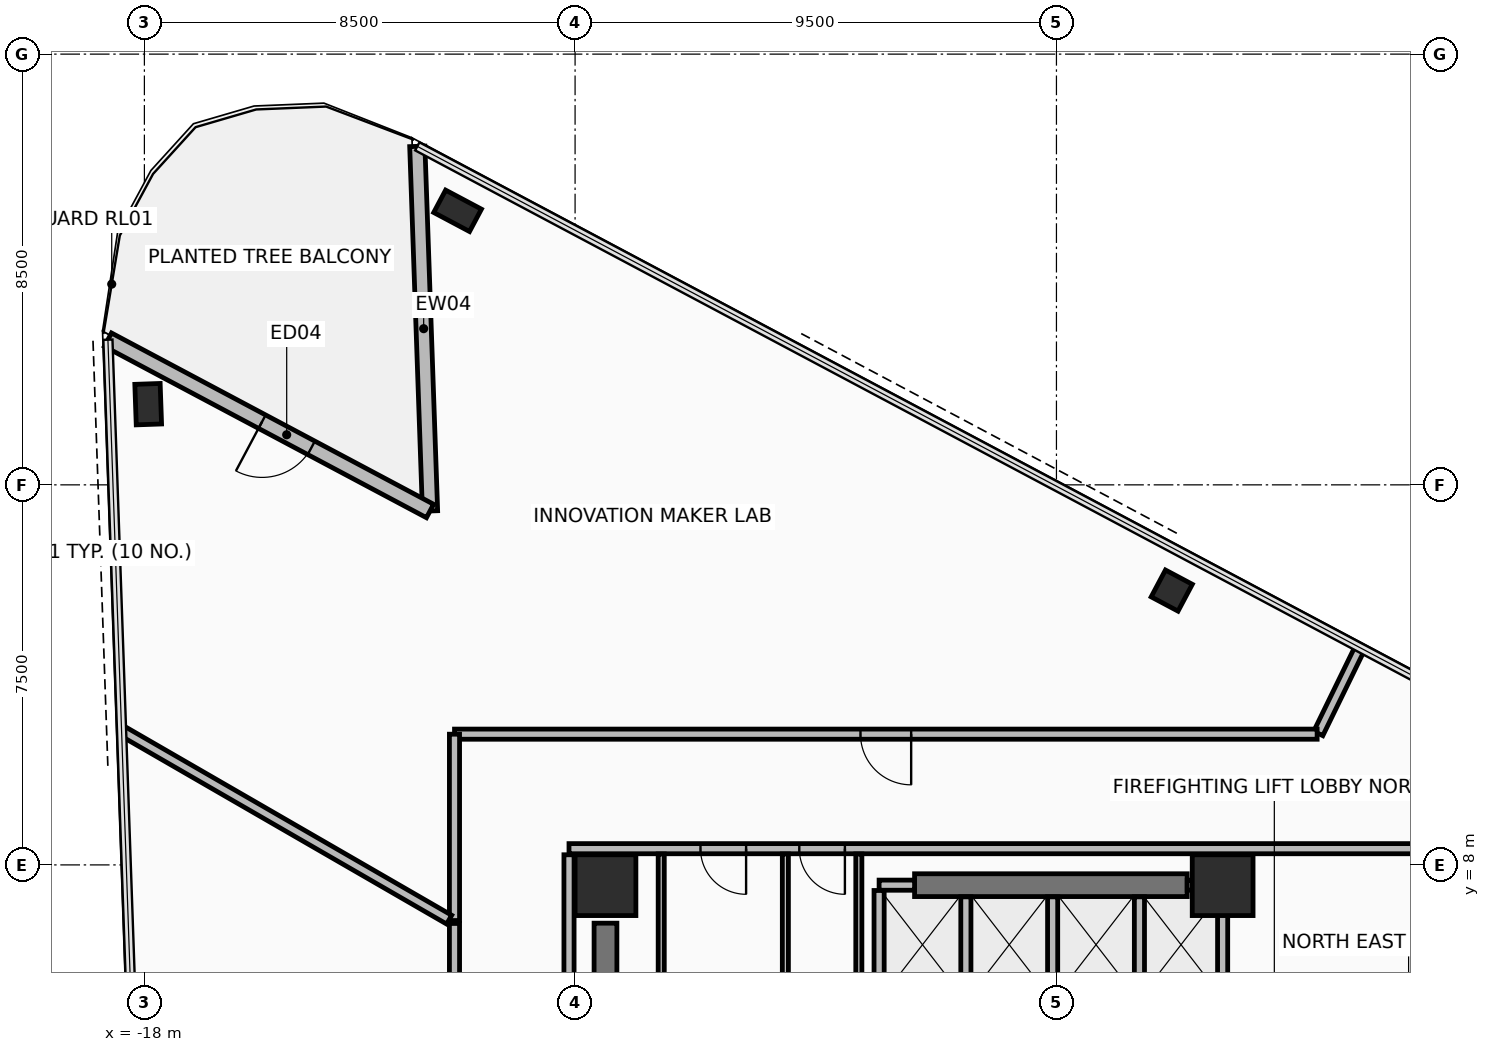
"""IFC4 building model, lengths in metres.
Left out: names, types, materials, properties, quantities, classifications, styles, units other than length and angle.
Written with IfcOpenShell. Run it as: python <this file> out.ifc"""

import sys

from ifc_helpers import new_model, si_unit, direction, frame, frame_2d, origin, origin_2d, place, context, subcontext, project, spatial, rectangle, hollow_rectangle, extrude, element, fill, save


model = new_model("IFC4")
c1 = context("Model", 3, precision=1e-05, world=origin(), true_north=direction((0.0, 1.0)))
c2 = subcontext(c1, "Body", "Model", "MODEL_VIEW")
j1 = project(units=[si_unit("LENGTHUNIT", "METRE"), si_unit("PLANEANGLEUNIT", "RADIAN")], contexts=[c1])
p1 = place(None, origin())
s1 = spatial("IfcSite", under=j1, at=p1, CompositionType="ELEMENT")
p2 = place(p1, origin())
s2 = spatial("IfcBuilding", under=s1, at=p2, CompositionType="ELEMENT")
p3 = place(p2, frame((0.0, 0.0, 160.4)))
s3 = spatial("IfcBuildingStorey", under=s2, at=p3, CompositionType="ELEMENT", Elevation=160.4)
for number, where, z_axis, x_axis in (
    (1, (3.28, 7.6, 0.0), (0.0, 0.0, 1.0), (1.0, 0.0, 0.0)),
    (2, (-8.9, 7.6, 0.0), (0.0, 0.0, 1.0), (1.0, 0.0, 0.0)),
):
    element("IfcColumn", number, at=place(p3, frame(where, z_axis=z_axis, x_axis=x_axis)), inside=s3, PredefinedType="COLUMN", context=c2, shape_type="SweptSolid", body=[
        extrude(rectangle(XDim=1.2, YDim=1.2, at=origin_2d()), origin(), (0.0, 0.0, 1.0), 4.75),
    ])
p4 = place(p3, frame((-17.925, 17.092, 0.0), z_axis=(0.0, 0.0, 1.0), x_axis=(-0.034899496703, 0.999390827019, 0.0)))
e3 = element("IfcColumn", 3, at=p4, inside=s3, PredefinedType="COLUMN", context=c2, shape_type="SweptSolid", body=[
    extrude(hollow_rectangle(XDim=0.5, YDim=0.8, WallThickness=0.04, at=origin_2d()), origin(), (0.0, 0.0, 1.0), 4.75),
])
p5 = place(p3, frame((2.276, 13.414, 0.0), z_axis=(0.0, 0.0, 1.0), x_axis=(-0.88294841224, 0.469470021751, 0.0)))
e4 = element("IfcColumn", 4, at=p5, inside=s3, PredefinedType="COLUMN", context=c2, shape_type="SweptSolid", body=[
    extrude(hollow_rectangle(XDim=0.6, YDim=0.6, WallThickness=0.036, at=origin_2d()), origin(), (0.0, 0.0, 1.0), 4.75),
])
p6 = place(p3, frame((-11.819, 20.908, 0.0), z_axis=(0.0, 0.0, 1.0), x_axis=(-0.88294841224, 0.469470021751, 0.0)))
e5 = element("IfcColumn", 5, at=p6, inside=s3, PredefinedType="COLUMN", context=c2, shape_type="SweptSolid", body=[
    extrude(hollow_rectangle(XDim=0.5, YDim=0.8, WallThickness=0.04, at=origin_2d()), origin(), (0.0, 0.0, 1.0), 4.75),
])
p7 = place(p3, frame((-12.614, 22.18, 0.0), z_axis=(0.0, 0.0, 1.0), x_axis=(0.034925918675, -0.999389903994, 0.0)))
e6 = element("IfcWall", 6, at=p7, inside=s3, PredefinedType="STANDARD", context=c2, shape_type="SweptSolid", body=[
    extrude(rectangle(XDim=7.2, YDim=0.3, at=frame_2d((3.6, 0.0))), origin(), (0.0, 0.0, 1.0), 2.25),
])
p8 = place(p3, frame((-12.363, 14.984, 0.0), z_axis=(0.0, 0.0, 1.0), x_axis=(-0.882950149473, 0.469466754463, 0.0)))
e7 = element("IfcWall", 7, at=p8, inside=s3, PredefinedType="STANDARD", context=c2, shape_type="SweptSolid", body=[
    extrude(rectangle(XDim=7.2, YDim=0.3, at=frame_2d((3.6, 0.0))), origin(), (0.0, 0.0, 1.0), 2.25),
])
p9 = place(p8, frame((2.654, 0.0, 0.0)))
e8 = element("IfcOpeningElement", 8, at=p9, cuts=e7, PredefinedType="OPENING", context=c2, shape_type="SweptSolid", body=[
    extrude(rectangle(XDim=1.1, YDim=2.2, at=frame_2d((0.55, 1.1))), frame((0.0, 0.16, 0.0), z_axis=(0.0, -1.0, 0.0), x_axis=(1.0, 0.0, 0.0)), (0.0, 0.0, 1.0), 0.32),
])
p10 = place(p3, frame((-2.8, 7.6, 0.0), z_axis=(0.0, 0.0, 1.0), x_axis=(1.0, 0.0, 0.0)))
e9 = element("IfcWall", 9, at=p10, inside=s3, PredefinedType="SHEAR", context=c2, shape_type="SweptSolid", body=[
    extrude(rectangle(XDim=5.38, YDim=0.45, at=frame_2d((2.69, 0.0))), origin(), (0.0, 0.0, 1.0), 4.555),
])
p11 = place(p3, frame((-8.9, -3.85, 0.0), z_axis=(0.0, 0.0, 1.0), x_axis=(0.0, 1.0, 0.0)))
e10 = element("IfcWall", 10, at=p11, inside=s3, PredefinedType="SHEAR", context=c2, shape_type="SweptSolid", body=[
    extrude(rectangle(XDim=10.7, YDim=0.45, at=frame_2d((5.35, 0.0))), origin(), (0.0, 0.0, 1.0), 4.555),
])
p12 = place(p3, frame((9.62, 8.32, 0.0), z_axis=(0.0, 0.0, 1.0), x_axis=(-1.0, 0.0, 0.0)))
e11 = element("IfcWall", 11, at=p12, inside=s3, PredefinedType="PARTITIONING", context=c2, shape_type="SweptSolid", body=[
    extrude(rectangle(XDim=19.24, YDim=0.2, at=frame_2d((9.62, 0.0))), origin(), (0.0, 0.0, 1.0), 2.75),
])
p13 = place(p12, frame((15.745, 0.0, 0.0)))
e12 = element("IfcOpeningElement", 12, at=p13, cuts=e11, PredefinedType="OPENING", context=c2, shape_type="SweptSolid", body=[
    extrude(rectangle(XDim=0.9, YDim=2.1, at=frame_2d((0.45, 1.05))), frame((0.0, 0.11, 0.0), z_axis=(0.0, -1.0, 0.0), x_axis=(1.0, 0.0, 0.0)), (0.0, 0.0, 1.0), 0.22),
])
p14 = place(p12, frame((13.795, 0.0, 0.0)))
e13 = element("IfcOpeningElement", 13, at=p14, cuts=e11, PredefinedType="OPENING", context=c2, shape_type="SweptSolid", body=[
    extrude(rectangle(XDim=0.9, YDim=2.1, at=frame_2d((0.45, 1.05))), frame((0.0, 0.11, 0.0), z_axis=(0.0, -1.0, 0.0), x_axis=(1.0, 0.0, 0.0)), (0.0, 0.0, 1.0), 0.22),
])
p15 = place(p3, frame((-9.62, 8.2, 0.0), z_axis=(0.0, 0.0, 1.0), x_axis=(0.0, -1.0, 0.0)))
e14 = element("IfcWall", 14, at=p15, inside=s3, PredefinedType="PARTITIONING", context=c2, shape_type="SweptSolid", body=[
    extrude(rectangle(XDim=16.4, YDim=0.2, at=frame_2d((8.2, 0.0))), origin(), (0.0, 0.0, 1.0), 2.75),
])
p16 = place(p15, frame((12.65, 0.0, 0.0)))
e15 = element("IfcOpeningElement", 15, at=p16, cuts=e14, PredefinedType="OPENING", context=c2, shape_type="SweptSolid", body=[
    extrude(rectangle(XDim=1.1, YDim=2.15, at=frame_2d((0.55, 1.075))), frame((0.0, 0.11, 0.0), z_axis=(0.0, -1.0, 0.0), x_axis=(1.0, 0.0, 0.0)), (0.0, 0.0, 1.0), 0.22),
])
p17 = place(p3, frame((-3.5, 7.6, 0.0), z_axis=(0.0, 0.0, 1.0), x_axis=(1.0, 0.0, 0.0)))
e16 = element("IfcWall", 16, at=p17, inside=s3, PredefinedType="PARTITIONING", context=c2, shape_type="SweptSolid", body=[
    extrude(rectangle(XDim=0.7, YDim=0.2, at=frame_2d((0.35, 0.0))), origin(), (0.0, 0.0, 1.0), 3.75),
])
p18 = place(p3, frame((-3.5, 5.38, 0.0), z_axis=(0.0, 0.0, 1.0), x_axis=(0.0, 1.0, 0.0)))
e17 = element("IfcWall", 17, at=p18, inside=s3, PredefinedType="PARTITIONING", context=c2, shape_type="SweptSolid", body=[
    extrude(rectangle(XDim=2.115, YDim=0.2, at=frame_2d((1.058, 0.0))), origin(), (0.0, 0.0, 1.0), 3.75),
])
for number, where, z_axis, x_axis in (
    (18, (-1.788, 5.38, 0.0), (0.0, 0.0, 1.0), (0.0, 1.0, 0.0)),
    (19, (-0.075, 5.38, 0.0), (0.0, 0.0, 1.0), (0.0, 1.0, 0.0)),
    (20, (1.637, 5.38, 0.0), (0.0, 0.0, 1.0), (0.0, 1.0, 0.0)),
):
    element("IfcWall", number, at=place(p3, frame(where, z_axis=z_axis, x_axis=x_axis)), inside=s3, PredefinedType="PARTITIONING", context=c2, shape_type="SweptSolid", body=[
        extrude(rectangle(XDim=1.99, YDim=0.2, at=frame_2d((0.995, 0.0))), origin(), (0.0, 0.0, 1.0), 3.75),
    ])
p19 = place(p3, frame((2.58, 7.6, 0.0), z_axis=(0.0, 0.0, 1.0), x_axis=(1.0, 0.0, 0.0)))
e21 = element("IfcWall", 21, at=p19, inside=s3, PredefinedType="PARTITIONING", context=c2, shape_type="SweptSolid", body=[
    extrude(rectangle(XDim=0.7, YDim=0.2, at=frame_2d((0.35, 0.0))), origin(), (0.0, 0.0, 1.0), 2.75),
])
p20 = place(p3, frame((3.28, 5.38, 0.0), z_axis=(0.0, 0.0, 1.0), x_axis=(0.0, 1.0, 0.0)))
e22 = element("IfcWall", 22, at=p20, inside=s3, PredefinedType="PARTITIONING", context=c2, shape_type="SweptSolid", body=[
    extrude(rectangle(XDim=2.115, YDim=0.2, at=frame_2d((1.058, 0.0))), origin(), (0.0, 0.0, 1.0), 2.75),
])
for number, where, z_axis, x_axis in (
    (23, (-5.35, 4.765, 0.0), (0.0, 0.0, 1.0), (0.0, 1.0, 0.0)),
    (24, (-7.8, 8.215, 0.0), (0.0, 0.0, 1.0), (0.0, -1.0, 0.0)),
    (25, (-3.9, 4.765, 0.0), (0.0, 0.0, 1.0), (0.0, 1.0, 0.0)),
):
    element("IfcWall", number, at=place(p3, frame(where, z_axis=z_axis, x_axis=x_axis)), inside=s3, PredefinedType="PARTITIONING", context=c2, shape_type="SweptSolid", body=[
        extrude(rectangle(XDim=3.45, YDim=0.12, at=frame_2d((1.725, 0.0))), origin(), (0.0, 0.0, 1.0), 3.75),
    ])
p21 = place(p3, frame((5.982, 12.265, 0.0), z_axis=(0.0, 0.0, 1.0), x_axis=(-0.438366708416, -0.898796211025, 0.0)))
e26 = element("IfcWall", 26, at=p21, inside=s3, PredefinedType="PARTITIONING", context=c2, shape_type="SweptSolid", body=[
    extrude(rectangle(XDim=1.859, YDim=0.2, at=frame_2d((0.93, 0.0))), origin(), (0.0, 0.0, 1.0), 2.25),
])
p22 = place(p3, frame((5.145, 10.58, 0.0), z_axis=(0.0, 0.0, 1.0), x_axis=(-1.0, 0.0, 0.0)))
e27 = element("IfcWall", 27, at=p22, inside=s3, PredefinedType="PARTITIONING", context=c2, shape_type="SweptSolid", body=[
    extrude(rectangle(XDim=17.024, YDim=0.2, at=frame_2d((8.512, 0.0))), origin(), (0.0, 0.0, 1.0), 2.75),
])
p23 = place(p22, frame((8.012, 0.0, 0.0)))
e28 = element("IfcOpeningElement", 28, at=p23, cuts=e27, PredefinedType="OPENING", context=c2, shape_type="SweptSolid", body=[
    extrude(rectangle(XDim=1.0, YDim=2.15, at=frame_2d((0.5, 1.075))), frame((0.0, 0.11, 0.0), z_axis=(0.0, -1.0, 0.0), x_axis=(1.0, 0.0, 0.0)), (0.0, 0.0, 1.0), 0.22),
])
p24 = place(p3, frame((-11.88, 10.579, 0.0), z_axis=(0.0, 0.0, 1.0), x_axis=(0.0, -1.0, 0.0)))
e29 = element("IfcWall", 29, at=p24, inside=s3, PredefinedType="PARTITIONING", context=c2, shape_type="SweptSolid", body=[
    extrude(rectangle(XDim=3.677, YDim=0.2, at=frame_2d((1.839, 0.0))), origin(), (0.0, 0.0, 1.0), 2.75),
])
p25 = place(p3, frame((-11.985, 6.92, 0.0), z_axis=(0.0, 0.0, 1.0), x_axis=(-0.866026817719, 0.499997550986, 0.0)))
e30 = element("IfcWall", 30, at=p25, inside=s3, PredefinedType="PARTITIONING", context=c2, shape_type="SweptSolid", body=[
    extrude(rectangle(XDim=7.452, YDim=0.2, at=frame_2d((3.726, 0.0))), origin(), (0.0, 0.0, 1.0), 2.25),
])
p26 = place(p3, frame((-11.88, 6.844, 0.0), z_axis=(0.0, 0.0, 1.0), x_axis=(0.0, -1.0, 0.0)))
e31 = element("IfcWall", 31, at=p26, inside=s3, PredefinedType="PARTITIONING", context=c2, shape_type="SweptSolid", body=[
    extrude(rectangle(XDim=17.424, YDim=0.2, at=frame_2d((8.712, 0.0))), origin(), (0.0, 0.0, 1.0), 2.75),
])
p27 = place(p26, frame((8.212, 0.0, 0.0)))
e32 = element("IfcOpeningElement", 32, at=p27, cuts=e31, PredefinedType="OPENING", context=c2, shape_type="SweptSolid", body=[
    extrude(rectangle(XDim=1.0, YDim=2.15, at=frame_2d((0.5, 1.075))), frame((0.0, 0.11, 0.0), z_axis=(0.0, -1.0, 0.0), x_axis=(1.0, 0.0, 0.0)), (0.0, 0.0, 1.0), 0.22),
])
p28 = place(p9, frame((1.1, 0.0, 0.0), z_axis=(0.0, 0.0, 1.0), x_axis=(-1.0, 0.0, 0.0)))
e33 = element("IfcDoor", 33, at=p28, inside=s3, OperationType="SINGLE_SWING_LEFT", PredefinedType="DOOR", context=c2, shape_type="SweptSolid", body=[
    extrude(rectangle(XDim=1.1, YDim=2.2, at=frame_2d((0.55, 1.1))), frame((0.0, 0.025, 0.0), z_axis=(0.0, -1.0, 0.0), x_axis=(1.0, 0.0, 0.0)), (0.0, 0.0, 1.0), 0.05),
])
fill(e8, e33)
p29 = place(p13, origin())
e34 = element("IfcDoor", 34, at=p29, inside=s3, OperationType="SINGLE_SWING_LEFT", PredefinedType="DOOR", context=c2, shape_type="SweptSolid", body=[
    extrude(rectangle(XDim=0.9, YDim=2.1, at=frame_2d((0.45, 1.05))), frame((0.0, 0.025, 0.0), z_axis=(0.0, -1.0, 0.0), x_axis=(1.0, 0.0, 0.0)), (0.0, 0.0, 1.0), 0.05),
])
fill(e12, e34)
p30 = place(p14, origin())
e35 = element("IfcDoor", 35, at=p30, inside=s3, OperationType="SINGLE_SWING_LEFT", PredefinedType="DOOR", context=c2, shape_type="SweptSolid", body=[
    extrude(rectangle(XDim=0.9, YDim=2.1, at=frame_2d((0.45, 1.05))), frame((0.0, 0.025, 0.0), z_axis=(0.0, -1.0, 0.0), x_axis=(1.0, 0.0, 0.0)), (0.0, 0.0, 1.0), 0.05),
])
fill(e13, e35)
p31 = place(p23, origin())
e36 = element("IfcDoor", 36, at=p31, inside=s3, OperationType="SINGLE_SWING_RIGHT", PredefinedType="DOOR", context=c2, shape_type="SweptSolid", body=[
    extrude(rectangle(XDim=1.0, YDim=2.15, at=frame_2d((0.5, 1.075))), frame((0.0, 0.025, 0.0), z_axis=(0.0, -1.0, 0.0), x_axis=(1.0, 0.0, 0.0)), (0.0, 0.0, 1.0), 0.05),
])
fill(e28, e36)
save(model, sys.argv[1])
